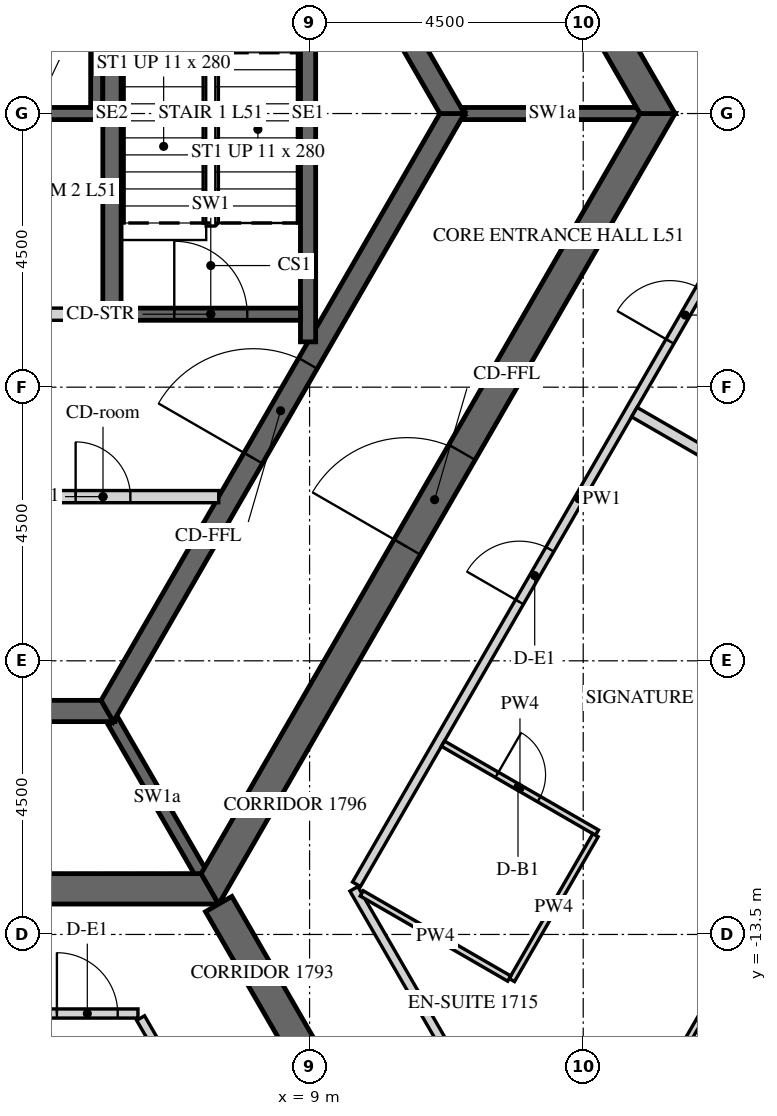
"""IFC4 building model, lengths in metres.
Left out: names, types, materials, properties, quantities, classifications, styles, units other than length and angle.
Written with IfcOpenShell. Run it as: python <this file> out.ifc"""

import sys

from ifc_helpers import new_model, si_unit, direction, frame, frame_2d, origin, place, context, subcontext, project, spatial, polyline, rectangle, outline, extrude, element, fill, save


model = new_model("IFC4")
c1 = context("Model", 3, precision=1e-05, world=origin(), true_north=direction((0.0, 1.0)))
c2 = subcontext(c1, "Body", "Model", "MODEL_VIEW")
j1 = project(units=[si_unit("LENGTHUNIT", "METRE"), si_unit("PLANEANGLEUNIT", "RADIAN")], contexts=[c1])
p1 = place(None, origin())
s1 = spatial("IfcSite", under=j1, at=p1, CompositionType="ELEMENT")
p2 = place(p1, origin())
s2 = spatial("IfcBuilding", under=s1, at=p2, CompositionType="ELEMENT")
p3 = place(p2, frame((0.0, 0.0, 215.1)))
s3 = spatial("IfcBuildingStorey", under=s2, at=p3, CompositionType="ELEMENT", Elevation=215.1)
p4 = place(p3, frame((-7.361, -12.75, -0.15), z_axis=(0.0, 0.0, 1.0), x_axis=(1.0, 0.0, 0.0)))
e1 = element("IfcWall", 1, at=p4, inside=s3, PredefinedType="SHEAR", context=c2, shape_type="SweptSolid", body=[
    extrude(outline(polyline([(-0.144, -0.25), (14.866, -0.25), (14.578, 0.25), (0.144, 0.25), (-0.144, -0.25)])), origin(), (0.0, 0.0, 1.0), 3.9),
])
p5 = place(p4, frame((6.761, 0.0, 0.15)))
e2 = element("IfcOpeningElement", 2, at=p5, cuts=e1, PredefinedType="OPENING", context=c2, shape_type="SweptSolid", body=[
    extrude(rectangle(XDim=1.2, YDim=2.4, at=frame_2d((0.6, 1.2))), frame((0.0, 0.26, 0.0), z_axis=(0.0, -1.0, 0.0), x_axis=(1.0, 0.0, 0.0)), (0.0, 0.0, 1.0), 0.52),
])
p6 = place(p3, frame((7.361, -12.75, -0.15), z_axis=(0.0, 0.0, 1.0), x_axis=(0.50000571537, 0.866022103989, 0.0)))
e3 = element("IfcWall", 3, at=p6, inside=s3, PredefinedType="SHEAR", context=c2, shape_type="SweptSolid", body=[
    extrude(outline(polyline([(-0.144, -0.25), (14.867, -0.25), (14.578, 0.25), (0.144, 0.25), (-0.144, -0.25)])), origin(), (0.0, 0.0, 1.0), 3.9),
])
p7 = place(p6, frame((6.49, 0.0, 0.15)))
e4 = element("IfcOpeningElement", 4, at=p7, cuts=e3, PredefinedType="OPENING", context=c2, shape_type="SweptSolid", body=[
    extrude(rectangle(XDim=1.8, YDim=2.4, at=frame_2d((0.9, 1.2))), frame((0.0, 0.26, 0.0), z_axis=(0.0, -1.0, 0.0), x_axis=(1.0, 0.0, 0.0)), (0.0, 0.0, 1.0), 0.52),
])
p8 = place(p3, frame((14.722, 0.0, -0.15), z_axis=(0.0, 0.0, 1.0), x_axis=(-0.50000571537, 0.866022103989, 0.0)))
e5 = element("IfcWall", 5, at=p8, inside=s3, PredefinedType="SHEAR", context=c2, shape_type="SweptSolid", body=[
    extrude(outline(polyline([(-0.144, -0.25), (14.867, -0.25), (14.578, 0.25), (0.144, 0.25), (-0.144, -0.25)])), origin(), (0.0, 0.0, 1.0), 3.9),
])
p9 = place(p8, frame((6.432, 0.0, 0.15)))
e6 = element("IfcOpeningElement", 6, at=p9, cuts=e5, PredefinedType="OPENING", context=c2, shape_type="SweptSolid", body=[
    extrude(rectangle(XDim=1.8, YDim=2.4, at=frame_2d((0.9, 1.2))), frame((0.0, 0.26, 0.0), z_axis=(0.0, -1.0, 0.0), x_axis=(1.0, 0.0, 0.0)), (0.0, 0.0, 1.0), 0.52),
])
p10 = place(p3, frame((7.506, -13.0, -0.15), z_axis=(0.0, 0.0, 1.0), x_axis=(0.499988271576, -0.866032175087, 0.0)))
e7 = element("IfcWall", 7, at=p10, inside=s3, PredefinedType="SHEAR", context=c2, shape_type="SweptSolid", body=[
    extrude(rectangle(XDim=15.424, YDim=0.5, at=frame_2d((7.712, 0.0))), origin(), (0.0, 0.0, 1.0), 3.9),
])
p11 = place(p10, frame((6.812, 0.0, 0.15)))
e8 = element("IfcOpeningElement", 8, at=p11, cuts=e7, PredefinedType="OPENING", context=c2, shape_type="SweptSolid", body=[
    extrude(rectangle(XDim=1.8, YDim=2.4, at=frame_2d((0.9, 1.2))), frame((0.0, 0.26, 0.0), z_axis=(0.0, -1.0, 0.0), x_axis=(1.0, 0.0, 0.0)), (0.0, 0.0, 1.0), 0.52),
])
p12 = place(p3, frame((-5.673, -9.825, -0.15), z_axis=(0.0, 0.0, 1.0), x_axis=(1.0, 0.0, 0.0)))
e9 = element("IfcWall", 9, at=p12, inside=s3, PredefinedType="SHEAR", context=c2, shape_type="SweptSolid", body=[
    extrude(outline(polyline([(-0.101, -0.175), (11.446, -0.175), (11.244, 0.175), (0.101, 0.175), (-0.101, -0.175)])), origin(), (0.0, 0.0, 1.0), 3.9),
])
p13 = place(p3, frame((5.673, -9.825, -0.15), z_axis=(0.0, 0.0, 1.0), x_axis=(0.499995046907, 0.866028263435, 0.0)))
e10 = element("IfcWall", 10, at=p13, inside=s3, PredefinedType="SHEAR", context=c2, shape_type="SweptSolid", body=[
    extrude(outline(polyline([(-0.101, -0.175), (11.446, -0.175), (11.244, 0.175), (0.101, 0.175), (-0.101, -0.175)])), origin(), (0.0, 0.0, 1.0), 3.9),
])
p14 = place(p13, frame((4.801, 0.0, 0.15)))
e11 = element("IfcOpeningElement", 11, at=p14, cuts=e10, PredefinedType="OPENING", context=c2, shape_type="SweptSolid", body=[
    extrude(rectangle(XDim=1.8, YDim=2.4, at=frame_2d((0.9, 1.2))), frame((0.0, 0.185, 0.0), z_axis=(0.0, -1.0, 0.0), x_axis=(1.0, 0.0, 0.0)), (0.0, 0.0, 1.0), 0.37),
])
p15 = place(p3, frame((11.345, 0.0, -0.15), z_axis=(0.0, 0.0, 1.0), x_axis=(-0.499995046907, 0.866028263435, 0.0)))
e12 = element("IfcWall", 12, at=p15, inside=s3, PredefinedType="SHEAR", context=c2, shape_type="SweptSolid", body=[
    extrude(outline(polyline([(-0.101, -0.175), (11.446, -0.175), (11.244, 0.175), (0.101, 0.175), (-0.101, -0.175)])), origin(), (0.0, 0.0, 1.0), 3.9),
])
p16 = place(p15, frame((4.744, 0.0, 0.15)))
e13 = element("IfcOpeningElement", 13, at=p16, cuts=e12, PredefinedType="OPENING", context=c2, shape_type="SweptSolid", body=[
    extrude(rectangle(XDim=1.8, YDim=2.4, at=frame_2d((0.9, 1.2))), frame((0.0, 0.185, 0.0), z_axis=(0.0, -1.0, 0.0), x_axis=(1.0, 0.0, 0.0)), (0.0, 0.0, 1.0), 0.37),
])
p17 = place(p3, frame((-5.6, 0.0, -0.25), z_axis=(0.0, 0.0, 1.0), x_axis=(1.0, 0.0, 0.0)))
e14 = element("IfcWall", 14, at=p17, inside=s3, PredefinedType="SHEAR", context=c2, shape_type="SweptSolid", body=[
    extrude(rectangle(XDim=11.2, YDim=0.2, at=frame_2d((5.6, 0.0))), origin(), (0.0, 0.0, 1.0), 3.9),
])
p18 = place(p3, frame((5.5, 0.1, -0.25), z_axis=(0.0, 0.0, 1.0), x_axis=(0.0, 1.0, 0.0)))
e15 = element("IfcWall", 15, at=p18, inside=s3, PredefinedType="SHEAR", context=c2, shape_type="SweptSolid", body=[
    extrude(rectangle(XDim=3.1, YDim=0.2, at=frame_2d((1.55, 0.0))), origin(), (0.0, 0.0, 1.0), 3.9),
])
p19 = place(p3, frame((0.1, -3.3, 0.0), z_axis=(0.0, 0.0, 1.0), x_axis=(1.0, 0.0, 0.0)))
e16 = element("IfcWall", 16, at=p19, inside=s3, PredefinedType="PARTITIONING", context=c2, shape_type="SweptSolid", body=[
    extrude(rectangle(XDim=5.5, YDim=0.2, at=frame_2d((2.75, 0.0))), origin(), (0.0, 0.0, 1.0), 3.65),
])
p20 = place(p19, frame((2.3, 0.0, 0.0)))
e17 = element("IfcOpeningElement", 17, at=p20, cuts=e16, PredefinedType="OPENING", context=c2, shape_type="SweptSolid", body=[
    extrude(rectangle(XDim=0.9, YDim=2.1, at=frame_2d((0.45, 1.05))), frame((0.0, 0.11, 0.0), z_axis=(0.0, -1.0, 0.0), x_axis=(1.0, 0.0, 0.0)), (0.0, 0.0, 1.0), 0.22),
])
p21 = place(p3, frame((3.7, -6.3, 0.0), z_axis=(0.0, 0.0, 1.0), x_axis=(1.0, 0.0, 0.0)))
e18 = element("IfcWall", 18, at=p21, inside=s3, PredefinedType="PARTITIONING", context=c2, shape_type="SweptSolid", body=[
    extrude(rectangle(XDim=3.806, YDim=0.2, at=frame_2d((1.903, 0.0))), origin(), (0.0, 0.0, 1.0), 3.65),
])
p22 = place(p21, frame((1.453, 0.0, 0.0)))
e19 = element("IfcOpeningElement", 19, at=p22, cuts=e18, PredefinedType="OPENING", context=c2, shape_type="SweptSolid", body=[
    extrude(rectangle(XDim=0.9, YDim=2.1, at=frame_2d((0.45, 1.05))), frame((0.0, 0.11, 0.0), z_axis=(0.0, -1.0, 0.0), x_axis=(1.0, 0.0, 0.0)), (0.0, 0.0, 1.0), 0.22),
])
for number, where, z_axis, x_axis in (
    (20, (11.547, 0.0, -0.15), (0.0, 0.0, 1.0), (1.0, 0.0, 0.0)),
    (21, (5.773, -10.0, -0.15), (0.0, 0.0, 1.0), (0.5, -0.866, 0.0)),
):
    element("IfcWall", number, at=place(p3, frame(where, z_axis=z_axis, x_axis=x_axis)), inside=s3, PredefinedType="SHEAR", context=c2, shape_type="SweptSolid", body=[
        extrude(rectangle(XDim=2.887, YDim=0.2, at=frame_2d((1.443, 0.0))), origin(), (0.0, 0.0, 1.0), 3.9),
    ])
p23 = place(p3, frame((5.75, -3.4, -0.25), z_axis=(0.0, 0.0, 1.0), x_axis=(0.0, 1.0, 0.0)))
e22 = element("IfcWall", 22, at=p23, inside=s3, PredefinedType="SHEAR", context=c2, shape_type="SweptSolid", body=[
    extrude(rectangle(XDim=6.8, YDim=0.3, at=frame_2d((3.4, 0.0))), origin(), (0.0, 0.0, 1.0), 3.9),
])
p24 = place(p3, frame((8.975, -3.755, -0.25), z_axis=(0.0, 0.0, 1.0), x_axis=(0.0, 1.0, 0.0)))
e23 = element("IfcWall", 23, at=p24, inside=s3, PredefinedType="SHEAR", context=c2, shape_type="SweptSolid", body=[
    extrude(rectangle(XDim=7.51, YDim=0.25, at=frame_2d((3.755, 0.0))), origin(), (0.0, 0.0, 1.0), 3.9),
])
p25 = place(p3, frame((5.9, -3.3, -0.25), z_axis=(0.0, 0.0, 1.0), x_axis=(1.0, 0.0, 0.0)))
e24 = element("IfcWall", 24, at=p25, inside=s3, PredefinedType="SHEAR", context=c2, shape_type="SweptSolid", body=[
    extrude(rectangle(XDim=2.95, YDim=0.2, at=frame_2d((1.475, 0.0))), origin(), (0.0, 0.0, 1.0), 3.9),
])
p26 = place(p25, frame((0.875, 0.0, 0.25)))
e25 = element("IfcOpeningElement", 25, at=p26, cuts=e24, PredefinedType="OPENING", context=c2, shape_type="SweptSolid", body=[
    extrude(rectangle(XDim=1.2, YDim=2.4, at=frame_2d((0.6, 1.2))), frame((0.0, 0.11, 0.0), z_axis=(0.0, -1.0, 0.0), x_axis=(1.0, 0.0, 0.0)), (0.0, 0.0, 1.0), 0.22),
])
p27 = place(p3, frame((-8.458, -14.8, 0.0), z_axis=(0.0, 0.0, 1.0), x_axis=(1.0, 0.0, 0.0)))
e26 = element("IfcWall", 26, at=p27, inside=s3, PredefinedType="PARTITIONING", context=c2, shape_type="SweptSolid", body=[
    extrude(rectangle(XDim=14.636, YDim=0.15, at=frame_2d((7.318, 0.0))), origin(), (0.0, 0.0, 1.0), 2.988),
])
p28 = place(p27, frame((1.881, 0.0, 0.0)))
e27 = element("IfcOpeningElement", 27, at=p28, cuts=e26, PredefinedType="OPENING", context=c2, shape_type="SweptSolid", body=[
    extrude(rectangle(XDim=1.0, YDim=2.1, at=frame_2d((0.5, 1.05))), frame((0.0, 0.085, 0.0), z_axis=(0.0, -1.0, 0.0), x_axis=(1.0, 0.0, 0.0)), (0.0, 0.0, 1.0), 0.17),
])
p29 = place(p27, frame((7.872, 0.0, 0.0)))
e28 = element("IfcOpeningElement", 28, at=p29, cuts=e26, PredefinedType="OPENING", context=c2, shape_type="SweptSolid", body=[
    extrude(rectangle(XDim=1.0, YDim=2.1, at=frame_2d((0.5, 1.05))), frame((0.0, 0.085, 0.0), z_axis=(0.0, -1.0, 0.0), x_axis=(1.0, 0.0, 0.0)), (0.0, 0.0, 1.0), 0.17),
])
p30 = place(p27, frame((13.303, 0.0, 0.0)))
e29 = element("IfcOpeningElement", 29, at=p30, cuts=e26, PredefinedType="OPENING", context=c2, shape_type="SweptSolid", body=[
    extrude(rectangle(XDim=1.0, YDim=2.1, at=frame_2d((0.5, 1.05))), frame((0.0, 0.085, 0.0), z_axis=(0.0, -1.0, 0.0), x_axis=(1.0, 0.0, 0.0)), (0.0, 0.0, 1.0), 0.17),
])
p31 = place(p3, frame((6.221, -14.875, 0.0), z_axis=(0.0, 0.0, 1.0), x_axis=(0.499989830942, -0.866031274813, 0.0)))
e30 = element("IfcWall", 30, at=p31, inside=s3, PredefinedType="PARTITIONING", context=c2, shape_type="SweptSolid", body=[
    extrude(rectangle(XDim=7.93, YDim=0.15, at=frame_2d((3.965, 0.0))), origin(), (0.0, 0.0, 1.0), 2.988),
])
p32 = place(p3, frame((13.699, -19.628, 0.0), z_axis=(0.0, 0.0, 1.0), x_axis=(-0.499997422768, 0.866026891745, 0.0)))
e31 = element("IfcWall", 31, at=p32, inside=s3, PredefinedType="PARTITIONING", context=c2, shape_type="SweptSolid", body=[
    extrude(rectangle(XDim=7.942, YDim=0.15, at=frame_2d((3.971, 0.0))), origin(), (0.0, 0.0, 1.0), 2.988),
])
p33 = place(p3, frame((9.772, -12.675, 0.0), z_axis=(0.0, 0.0, 1.0), x_axis=(0.499996322767, 0.866027526826, 0.0)))
e32 = element("IfcWall", 32, at=p33, inside=s3, PredefinedType="PARTITIONING", context=c2, shape_type="SweptSolid", body=[
    extrude(rectangle(XDim=14.636, YDim=0.15, at=frame_2d((7.318, 0.0))), origin(), (0.0, 0.0, 1.0), 2.988),
])
p34 = place(p33, frame((5.361, 0.0, 0.0)))
e33 = element("IfcOpeningElement", 33, at=p34, cuts=e32, PredefinedType="OPENING", context=c2, shape_type="SweptSolid", body=[
    extrude(rectangle(XDim=1.0, YDim=2.1, at=frame_2d((0.5, 1.05))), frame((0.0, 0.085, 0.0), z_axis=(0.0, -1.0, 0.0), x_axis=(1.0, 0.0, 0.0)), (0.0, 0.0, 1.0), 0.17),
])
p35 = place(p33, frame((10.309, 0.0, 0.0)))
e34 = element("IfcOpeningElement", 34, at=p35, cuts=e32, PredefinedType="OPENING", context=c2, shape_type="SweptSolid", body=[
    extrude(rectangle(XDim=1.0, YDim=2.1, at=frame_2d((0.5, 1.05))), frame((0.0, 0.085, 0.0), z_axis=(0.0, -1.0, 0.0), x_axis=(1.0, 0.0, 0.0)), (0.0, 0.0, 1.0), 0.17),
])
p36 = place(p33, frame((13.278, 0.0, 0.0)))
e35 = element("IfcOpeningElement", 35, at=p36, cuts=e32, PredefinedType="OPENING", context=c2, shape_type="SweptSolid", body=[
    extrude(rectangle(XDim=1.0, YDim=2.1, at=frame_2d((0.5, 1.05))), frame((0.0, 0.085, 0.0), z_axis=(0.0, -1.0, 0.0), x_axis=(1.0, 0.0, 0.0)), (0.0, 0.0, 1.0), 0.17),
])
p37 = place(p3, frame((17.046, 0.075, 0.0), z_axis=(0.0, 0.0, 1.0), x_axis=(-0.500008833422, 0.866020303746, 0.0)))
e36 = element("IfcWall", 36, at=p37, inside=s3, PredefinedType="PARTITIONING", context=c2, shape_type="SweptSolid", body=[
    extrude(rectangle(XDim=14.636, YDim=0.15, at=frame_2d((7.318, 0.0))), origin(), (0.0, 0.0, 1.0), 2.988),
])
p38 = place(p37, frame((9.07, 0.0, 0.0)))
e37 = element("IfcOpeningElement", 37, at=p38, cuts=e36, PredefinedType="OPENING", context=c2, shape_type="SweptSolid", body=[
    extrude(rectangle(XDim=1.0, YDim=2.1, at=frame_2d((0.5, 1.05))), frame((0.0, 0.085, 0.0), z_axis=(0.0, -1.0, 0.0), x_axis=(1.0, 0.0, 0.0)), (0.0, 0.0, 1.0), 0.17),
])
p39 = place(p3, frame((4.531, -14.875, 0.0), z_axis=(0.0, 0.0, 1.0), x_axis=(0.069743215787, -0.997564977258, 0.0)))
e38 = element("IfcWall", 38, at=p39, inside=s3, PredefinedType="PARTITIONING", context=c2, shape_type="SweptSolid", body=[
    extrude(rectangle(XDim=2.885, YDim=0.1, at=frame_2d((1.442, 0.0))), origin(), (0.0, 0.0, 1.0), 2.988),
])
p40 = place(p39, frame((0.985, 0.0, 0.0)))
e39 = element("IfcOpeningElement", 39, at=p40, cuts=e38, PredefinedType="OPENING", context=c2, shape_type="SweptSolid", body=[
    extrude(rectangle(XDim=0.8, YDim=2.1, at=frame_2d((0.4, 1.05))), frame((0.0, 0.06, 0.0), z_axis=(0.0, -1.0, 0.0), x_axis=(1.0, 0.0, 0.0)), (0.0, 0.0, 1.0), 0.12),
])
p41 = place(p3, frame((11.193, -10.363, 0.0), z_axis=(0.0, 0.0, 1.0), x_axis=(0.865989585315, -0.500062034277, 0.0)))
e40 = element("IfcWall", 40, at=p41, inside=s3, PredefinedType="PARTITIONING", context=c2, shape_type="SweptSolid", body=[
    extrude(rectangle(XDim=2.925, YDim=0.1, at=frame_2d((1.462, 0.0))), origin(), (0.0, 0.0, 1.0), 2.988),
])
p42 = place(p41, frame((1.025, 0.0, 0.0)))
e41 = element("IfcOpeningElement", 41, at=p42, cuts=e40, PredefinedType="OPENING", context=c2, shape_type="SweptSolid", body=[
    extrude(rectangle(XDim=0.8, YDim=2.1, at=frame_2d((0.4, 1.05))), frame((0.0, 0.06, 0.0), z_axis=(0.0, -1.0, 0.0), x_axis=(1.0, 0.0, 0.0)), (0.0, 0.0, 1.0), 0.12),
])
p43 = place(p3, frame((13.701, -11.868, 0.0), z_axis=(0.0, 0.0, 1.0), x_axis=(-0.499996545922, -0.866027397988, 0.0)))
e42 = element("IfcWall", 42, at=p43, inside=s3, PredefinedType="PARTITIONING", context=c2, shape_type="SweptSolid", body=[
    extrude(rectangle(XDim=2.75, YDim=0.1, at=frame_2d((1.375, 0.0))), origin(), (0.0, 0.0, 1.0), 2.988),
])
p44 = place(p3, frame((12.283, -14.225, 0.0), z_axis=(0.0, 0.0, 1.0), x_axis=(-0.866018616679, 0.500011755427, 0.0)))
e43 = element("IfcWall", 43, at=p44, inside=s3, PredefinedType="PARTITIONING", context=c2, shape_type="SweptSolid", body=[
    extrude(rectangle(XDim=2.8, YDim=0.1, at=frame_2d((1.4, 0.0))), origin(), (0.0, 0.0, 1.0), 2.988),
])
p45 = place(p3, frame((14.097, -17.183, 0.0), z_axis=(0.0, 0.0, 1.0), x_axis=(0.500001321243, 0.866024640963, 0.0)))
e44 = element("IfcWall", 44, at=p45, inside=s3, PredefinedType="PARTITIONING", context=c2, shape_type="SweptSolid", body=[
    extrude(rectangle(XDim=10.66, YDim=0.1, at=frame_2d((5.33, 0.0))), origin(), (0.0, 0.0, 1.0), 2.988),
])
p46 = place(p45, frame((4.9, 0.0, 0.0)))
e45 = element("IfcOpeningElement", 45, at=p46, cuts=e44, PredefinedType="OPENING", context=c2, shape_type="SweptSolid", body=[
    extrude(rectangle(XDim=0.9, YDim=2.1, at=frame_2d((0.45, 1.05))), frame((0.0, 0.06, 0.0), z_axis=(0.0, -1.0, 0.0), x_axis=(1.0, 0.0, 0.0)), (0.0, 0.0, 1.0), 0.12),
])
p47 = place(p3, frame((25.231, -11.198, 0.0), z_axis=(0.0, 0.0, 1.0), x_axis=(-0.866032662629, 0.499987427101, 0.0)))
e46 = element("IfcWall", 46, at=p47, inside=s3, PredefinedType="PARTITIONING", context=c2, shape_type="SweptSolid", body=[
    extrude(rectangle(XDim=12.575, YDim=0.18, at=frame_2d((6.288, 0.0))), origin(), (0.0, 0.0, 1.0), 2.988),
])
p48 = place(p7, origin())
e47 = element("IfcDoor", 47, at=p48, inside=s3, OperationType="DOUBLE_DOOR_SINGLE_SWING", PredefinedType="DOOR", context=c2, shape_type="SweptSolid", body=[
    extrude(rectangle(XDim=1.8, YDim=2.4, at=frame_2d((0.9, 1.2))), frame((0.0, 0.025, 0.0), z_axis=(0.0, -1.0, 0.0), x_axis=(1.0, 0.0, 0.0)), (0.0, 0.0, 1.0), 0.05),
])
fill(e4, e47)
p49 = place(p14, origin())
e48 = element("IfcDoor", 48, at=p49, inside=s3, OperationType="DOUBLE_DOOR_SINGLE_SWING", PredefinedType="DOOR", context=c2, shape_type="SweptSolid", body=[
    extrude(rectangle(XDim=1.8, YDim=2.4, at=frame_2d((0.9, 1.2))), frame((0.0, 0.025, 0.0), z_axis=(0.0, -1.0, 0.0), x_axis=(1.0, 0.0, 0.0)), (0.0, 0.0, 1.0), 0.05),
])
fill(e11, e48)
p50 = place(p22, origin())
e49 = element("IfcDoor", 49, at=p50, inside=s3, OperationType="SINGLE_SWING_LEFT", PredefinedType="DOOR", context=c2, shape_type="SweptSolid", body=[
    extrude(rectangle(XDim=0.9, YDim=2.1, at=frame_2d((0.45, 1.05))), frame((0.0, 0.025, 0.0), z_axis=(0.0, -1.0, 0.0), x_axis=(1.0, 0.0, 0.0)), (0.0, 0.0, 1.0), 0.05),
])
fill(e19, e49)
p51 = place(p26, origin())
e50 = element("IfcDoor", 50, at=p51, inside=s3, OperationType="SINGLE_SWING_LEFT", PredefinedType="DOOR", context=c2, shape_type="SweptSolid", body=[
    extrude(rectangle(XDim=1.2, YDim=2.4, at=frame_2d((0.6, 1.2))), frame((0.0, 0.025, 0.0), z_axis=(0.0, -1.0, 0.0), x_axis=(1.0, 0.0, 0.0)), (0.0, 0.0, 1.0), 0.05),
])
fill(e25, e50)
p52 = place(p30, origin())
e51 = element("IfcDoor", 51, at=p52, inside=s3, OperationType="SINGLE_SWING_RIGHT", PredefinedType="DOOR", context=c2, shape_type="SweptSolid", body=[
    extrude(rectangle(XDim=1.0, YDim=2.1, at=frame_2d((0.5, 1.05))), frame((0.0, 0.025, 0.0), z_axis=(0.0, -1.0, 0.0), x_axis=(1.0, 0.0, 0.0)), (0.0, 0.0, 1.0), 0.05),
])
fill(e29, e51)
p53 = place(p34, origin())
e52 = element("IfcDoor", 52, at=p53, inside=s3, OperationType="SINGLE_SWING_LEFT", PredefinedType="DOOR", context=c2, shape_type="SweptSolid", body=[
    extrude(rectangle(XDim=1.0, YDim=2.1, at=frame_2d((0.5, 1.05))), frame((0.0, 0.025, 0.0), z_axis=(0.0, -1.0, 0.0), x_axis=(1.0, 0.0, 0.0)), (0.0, 0.0, 1.0), 0.05),
])
fill(e33, e52)
p54 = place(p42, origin())
e53 = element("IfcDoor", 53, at=p54, inside=s3, OperationType="SINGLE_SWING_RIGHT", PredefinedType="DOOR", context=c2, shape_type="SweptSolid", body=[
    extrude(rectangle(XDim=0.8, YDim=2.1, at=frame_2d((0.4, 1.05))), frame((0.0, 0.025, 0.0), z_axis=(0.0, -1.0, 0.0), x_axis=(1.0, 0.0, 0.0)), (0.0, 0.0, 1.0), 0.05),
])
fill(e41, e53)
p55 = place(p35, origin())
e54 = element("IfcDoor", 54, at=p55, inside=s3, OperationType="SINGLE_SWING_LEFT", PredefinedType="DOOR", context=c2, shape_type="SweptSolid", body=[
    extrude(rectangle(XDim=1.0, YDim=2.1, at=frame_2d((0.5, 1.05))), frame((0.0, 0.025, 0.0), z_axis=(0.0, -1.0, 0.0), x_axis=(1.0, 0.0, 0.0)), (0.0, 0.0, 1.0), 0.05),
])
fill(e34, e54)
save(model, sys.argv[1])
